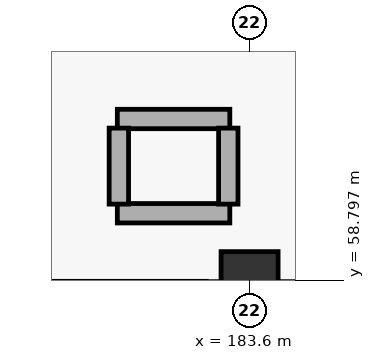
"""IFC4 building model, lengths in metres.
Left out: names, types, materials, properties, quantities, classifications, styles, units other than length and angle.
Written with IfcOpenShell. Run it as: python <this file> out.ifc"""

import sys

from ifc_helpers import new_model, si_unit, direction, frame, frame_2d, origin, origin_2d, place, context, subcontext, project, spatial, rectangle, extrude, element, save


model = new_model("IFC4")
c1 = context("Model", 3, precision=1e-05, world=origin(), true_north=direction((0.0, 1.0)))
c2 = subcontext(c1, "Body", "Model", "MODEL_VIEW")
j1 = project(units=[si_unit("LENGTHUNIT", "METRE"), si_unit("PLANEANGLEUNIT", "RADIAN")], contexts=[c1])
p1 = place(None, origin())
s1 = spatial("IfcSite", under=j1, at=p1, CompositionType="ELEMENT")
p2 = place(p1, origin())
s2 = spatial("IfcBuilding", under=s1, at=p2, CompositionType="ELEMENT")
p3 = place(p2, frame((0.0, 0.0, 15.6)))
s3 = spatial("IfcBuildingStorey", under=s2, at=p3, CompositionType="ELEMENT", Elevation=15.6)
p4 = place(p3, frame((183.6, 58.8, 0.0), z_axis=(0.0, 0.0, 1.0), x_axis=(1.0, 0.0, 0.0)))
e1 = element("IfcColumn", 1, at=p4, inside=s3, PredefinedType="COLUMN", context=c2, shape_type="SweptSolid", body=[
    extrude(rectangle(XDim=0.75, YDim=0.75, at=origin_2d()), origin(), (0.0, 0.0, 1.0), 5.1),
])
for number, where, z_axis, x_axis in (
    (2, (181.86, 60.92, 0.0), (0.0, 0.0, 1.0), (1.0, 0.0, 0.0)),
    (3, (181.86, 59.68, 0.0), (0.0, 0.0, 1.0), (1.0, 0.0, 0.0)),
):
    element("IfcWall", number, at=place(p3, frame(where, z_axis=z_axis, x_axis=x_axis)), inside=s3, PredefinedType="PARTITIONING", context=c2, shape_type="SweptSolid", body=[
        extrude(rectangle(XDim=1.48, YDim=0.255, at=frame_2d((0.74, 0.0))), origin(), (0.0, 0.0, 1.0), 4.22),
    ])
p5 = place(p3, frame((181.88, 59.8, 0.0), z_axis=(0.0, 0.0, 1.0), x_axis=(0.0, 1.0, 0.0)))
e4 = element("IfcWall", 4, at=p5, inside=s3, PredefinedType="PARTITIONING", context=c2, shape_type="SweptSolid", body=[
    extrude(rectangle(XDim=1.0, YDim=0.255, at=frame_2d((0.5, 0.0))), origin(), (0.0, 0.0, 1.0), 4.72),
])
p6 = place(p3, frame((183.32, 59.8, 0.0), z_axis=(0.0, 0.0, 1.0), x_axis=(0.0, 1.0, 0.0)))
e5 = element("IfcWall", 5, at=p6, inside=s3, PredefinedType="PARTITIONING", context=c2, shape_type="SweptSolid", body=[
    extrude(rectangle(XDim=1.0, YDim=0.255, at=frame_2d((0.5, 0.0))), origin(), (0.0, 0.0, 1.0), 4.22),
])
save(model, sys.argv[1])
